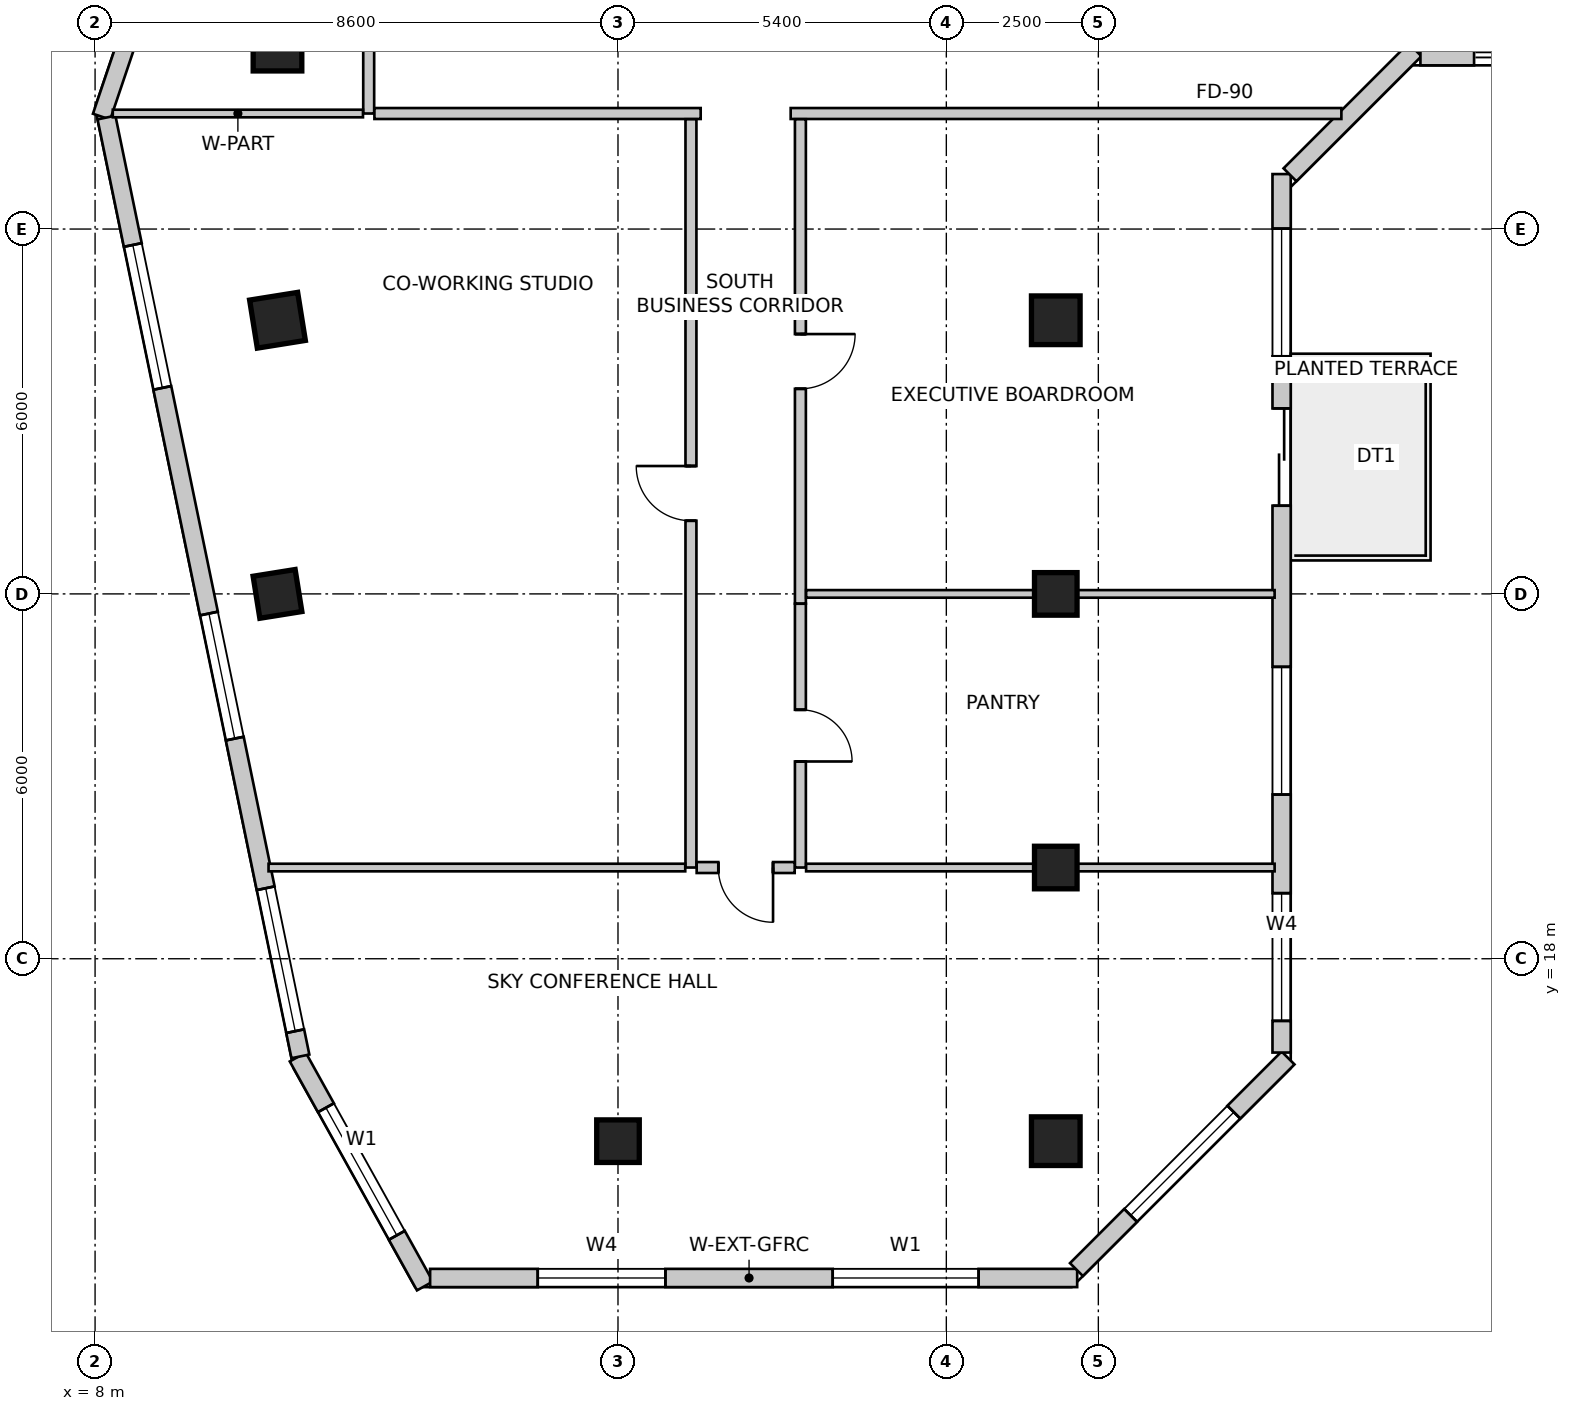
"""IFC4 building model, lengths in metres.
Left out: names, types, materials, properties, quantities, classifications, styles, units other than length and angle.
Written with IfcOpenShell. Run it as: python <this file> out.ifc"""

import sys

from ifc_helpers import new_model, si_unit, direction, frame, frame_2d, origin, origin_2d, place, context, subcontext, project, spatial, rectangle, extrude, source, transform, mapped, element, fill, save


model = new_model("IFC4")
c1 = context("Model", 3, precision=1e-05, world=origin(), true_north=direction((0.0, 1.0)))
c2 = subcontext(c1, "Body", "Model", "MODEL_VIEW")
j1 = project(units=[si_unit("LENGTHUNIT", "METRE"), si_unit("PLANEANGLEUNIT", "RADIAN")], contexts=[c1])
p1 = place(None, origin())
s1 = spatial("IfcSite", under=j1, at=p1, CompositionType="ELEMENT")
p2 = place(p1, origin())
s2 = spatial("IfcBuilding", under=s1, at=p2, CompositionType="ELEMENT")
p3 = place(p2, frame((0.0, 0.0, 239.4)))
s3 = spatial("IfcBuildingStorey", under=s2, at=p3, CompositionType="ELEMENT", Elevation=239.4)
m1 = source(origin(), c2, "Body", "SweptSolid", [
    extrude(rectangle(XDim=0.8, YDim=0.8, at=origin_2d()), origin(), (0.0, 0.0, 1.0), 3.5),
])
for number, where, z_axis, x_axis in (
    (1, (11.0, 33.0, 0.0), (0.0, 0.0, 1.0), (1.0, 0.0, 0.0)),
    (2, (11.0, 28.5, 0.0), (0.0, 0.0, 1.0), (0.158, -0.987, 0.0)),
):
    element("IfcColumn", number, at=place(p3, frame(where, z_axis=z_axis, x_axis=x_axis)), inside=s3, PredefinedType="COLUMN", context=c2, shape_type="MappedRepresentation", body=[
        mapped(m1, transform((0.0, 0.0, 0.0), scale=1.0)),
    ])
m2 = source(origin(), c2, "Body", "SweptSolid", [
    extrude(rectangle(XDim=0.7, YDim=0.7, at=origin_2d()), origin(), (0.0, 0.0, 1.0), 3.5),
])
p4 = place(p3, frame((11.0, 24.0, 0.0), z_axis=(0.0, 0.0, 1.0), x_axis=(0.158158067254, -0.987413806751, 0.0)))
e3 = element("IfcColumn", 3, at=p4, inside=s3, PredefinedType="COLUMN", context=c2, shape_type="MappedRepresentation", body=[
    mapped(m2, transform((0.0, 0.0, 0.0), scale=1.0)),
])
p5 = place(p3, frame((23.8, 28.5, 0.0), z_axis=(0.0, 0.0, 1.0), x_axis=(1.0, 0.0, 0.0)))
e4 = element("IfcColumn", 4, at=p5, inside=s3, PredefinedType="COLUMN", context=c2, shape_type="MappedRepresentation", body=[
    mapped(m1, transform((0.0, 0.0, 0.0), scale=1.0)),
])
for number, where, z_axis, x_axis in (
    (5, (23.8, 24.0, 0.0), (0.0, 0.0, 1.0), (1.0, 0.0, 0.0)),
    (6, (23.8, 19.5, 0.0), (0.0, 0.0, 1.0), (1.0, 0.0, 0.0)),
):
    element("IfcColumn", number, at=place(p3, frame(where, z_axis=z_axis, x_axis=x_axis)), inside=s3, PredefinedType="COLUMN", context=c2, shape_type="MappedRepresentation", body=[
        mapped(m2, transform((0.0, 0.0, 0.0), scale=1.0)),
    ])
p6 = place(p3, frame((23.8, 15.0, 0.0), z_axis=(0.0, 0.0, 1.0), x_axis=(1.0, 0.0, 0.0)))
e7 = element("IfcColumn", 7, at=p6, inside=s3, PredefinedType="COLUMN", context=c2, shape_type="MappedRepresentation", body=[
    mapped(m1, transform((0.0, 0.0, 0.0), scale=1.0)),
])
p7 = place(p3, frame((16.6, 15.0, 0.0), z_axis=(0.0, 0.0, 1.0), x_axis=(1.0, 0.0, 0.0)))
e8 = element("IfcColumn", 8, at=p7, inside=s3, PredefinedType="COLUMN", context=c2, shape_type="MappedRepresentation", body=[
    mapped(m2, transform((0.0, 0.0, 0.0), scale=1.0)),
])
p8 = place(p3, frame((11.333, 16.384, 0.0), z_axis=(0.0, 0.0, 1.0), x_axis=(0.485633305139, -0.874162623852, 0.0)))
e9 = element("IfcWall", 9, at=p8, inside=s3, PredefinedType="SOLIDWALL", context=c2, shape_type="SweptSolid", body=[
    extrude(rectangle(XDim=4.307, YDim=0.3, at=frame_2d((2.153, 0.0))), origin(), (0.0, 0.0, 1.0), 3.2),
])
m3 = source(origin(), c2, "Body", "SweptSolid", [
    extrude(rectangle(XDim=2.4, YDim=2.2, at=frame_2d((1.2, 1.1))), frame((0.0, 0.16, 0.0), z_axis=(0.0, -1.0, 0.0), x_axis=(1.0, 0.0, 0.0)), (0.0, 0.0, 1.0), 0.32),
])
p9 = place(p8, frame((0.954, 0.0, 0.85)))
e10 = element("IfcOpeningElement", 10, at=p9, cuts=e9, PredefinedType="OPENING", context=c2, shape_type="MappedRepresentation", body=[
    mapped(m3, transform((0.0, 0.0, 0.0), scale=1.0)),
])
p10 = place(p3, frame((13.51, 12.75, 0.0), z_axis=(0.0, 0.0, 1.0), x_axis=(1.0, 0.0, 0.0)))
e11 = element("IfcWall", 11, at=p10, inside=s3, PredefinedType="SOLIDWALL", context=c2, shape_type="SweptSolid", body=[
    extrude(rectangle(XDim=10.642, YDim=0.3, at=frame_2d((5.321, 0.0))), origin(), (0.0, 0.0, 1.0), 3.2),
])
m4 = source(origin(), c2, "Body", "SweptSolid", [
    extrude(rectangle(XDim=2.1, YDim=2.0, at=frame_2d((1.05, 1.0))), frame((0.0, 0.16, 0.0), z_axis=(0.0, -1.0, 0.0), x_axis=(1.0, 0.0, 0.0)), (0.0, 0.0, 1.0), 0.32),
])
p11 = place(p10, frame((1.77, 0.0, 0.85)))
e12 = element("IfcOpeningElement", 12, at=p11, cuts=e11, PredefinedType="OPENING", context=c2, shape_type="MappedRepresentation", body=[
    mapped(m4, transform((0.0, 0.0, 0.0), scale=1.0)),
])
p12 = place(p10, frame((6.621, 0.0, 0.85)))
e13 = element("IfcOpeningElement", 13, at=p12, cuts=e11, PredefinedType="OPENING", context=c2, shape_type="MappedRepresentation", body=[
    mapped(m3, transform((0.0, 0.0, 0.0), scale=1.0)),
])
p13 = place(p3, frame((24.14, 12.888, 0.0), z_axis=(0.0, 0.0, 1.0), x_axis=(0.707106781187, 0.707106781187, 0.0)))
e14 = element("IfcWall", 14, at=p13, inside=s3, PredefinedType="SOLIDWALL", context=c2, shape_type="SweptSolid", body=[
    extrude(rectangle(XDim=4.922, YDim=0.3, at=frame_2d((2.461, 0.0))), origin(), (0.0, 0.0, 1.0), 3.2),
])
p14 = place(p13, frame((1.261, 0.0, 0.85)))
e15 = element("IfcOpeningElement", 15, at=p14, cuts=e14, PredefinedType="OPENING", context=c2, shape_type="MappedRepresentation", body=[
    mapped(m3, transform((0.0, 0.0, 0.0), scale=1.0)),
])
p15 = place(p3, frame((27.514, 16.457, 0.0), z_axis=(0.0, 0.0, 1.0), x_axis=(0.0, 1.0, 0.0)))
e16 = element("IfcWall", 16, at=p15, inside=s3, PredefinedType="SOLIDWALL", context=c2, shape_type="SweptSolid", body=[
    extrude(rectangle(XDim=14.447, YDim=0.3, at=frame_2d((7.223, 0.0))), origin(), (0.0, 0.0, 1.0), 3.2),
])
m5 = source(origin(), c2, "Body", "SweptSolid", [
    extrude(rectangle(XDim=1.6, YDim=2.15, at=frame_2d((0.8, 1.075))), frame((0.0, 0.16, 0.0), z_axis=(0.0, -1.0, 0.0), x_axis=(1.0, 0.0, 0.0)), (0.0, 0.0, 1.0), 0.32),
])
p16 = place(p15, frame((8.993, 0.0, 0.0)))
e17 = element("IfcOpeningElement", 17, at=p16, cuts=e16, PredefinedType="OPENING", context=c2, shape_type="MappedRepresentation", body=[
    mapped(m5, transform((0.0, 0.0, 0.0), scale=1.0)),
])
p17 = place(p15, frame((0.521, 0.0, 0.85)))
e18 = element("IfcOpeningElement", 18, at=p17, cuts=e16, PredefinedType="OPENING", context=c2, shape_type="MappedRepresentation", body=[
    mapped(m4, transform((0.0, 0.0, 0.0), scale=1.0)),
])
p18 = place(p15, frame((4.243, 0.0, 0.85)))
e19 = element("IfcOpeningElement", 19, at=p18, cuts=e16, PredefinedType="OPENING", context=c2, shape_type="MappedRepresentation", body=[
    mapped(m4, transform((0.0, 0.0, 0.0), scale=1.0)),
])
p19 = place(p15, frame((11.45, 0.0, 0.85)))
e20 = element("IfcOpeningElement", 20, at=p19, cuts=e16, PredefinedType="OPENING", context=c2, shape_type="MappedRepresentation", body=[
    mapped(m4, transform((0.0, 0.0, 0.0), scale=1.0)),
])
p20 = place(p3, frame((27.652, 30.892, 0.0), z_axis=(0.0, 0.0, 1.0), x_axis=(0.707106781187, 0.707106781187, 0.0)))
e21 = element("IfcWall", 21, at=p20, inside=s3, PredefinedType="SOLIDWALL", context=c2, shape_type="SweptSolid", body=[
    extrude(rectangle(XDim=2.907, YDim=0.3, at=frame_2d((1.454, 0.0))), origin(), (0.0, 0.0, 1.0), 3.2),
])
p21 = place(p3, frame((29.797, 32.842, 0.0), z_axis=(0.0, 0.0, 1.0), x_axis=(1.0, 0.0, 0.0)))
e22 = element("IfcWall", 22, at=p21, inside=s3, PredefinedType="SOLIDWALL", context=c2, shape_type="SweptSolid", body=[
    extrude(rectangle(XDim=0.882, YDim=0.3, at=frame_2d((0.441, 0.0))), origin(), (0.0, 0.0, 1.0), 3.2),
])
p22 = place(p3, frame((13.269, 47.134, 0.0), z_axis=(0.0, 0.0, 1.0), x_axis=(-0.319920776449, -0.947444297464, 0.0)))
e23 = element("IfcWall", 23, at=p22, inside=s3, PredefinedType="SOLIDWALL", context=c2, shape_type="SweptSolid", body=[
    extrude(rectangle(XDim=16.133, YDim=0.3, at=frame_2d((8.067, 0.0))), origin(), (0.0, 0.0, 1.0), 3.2),
])
p23 = place(p22, frame((2.513, 0.0, 0.85)))
e24 = element("IfcOpeningElement", 24, at=p23, cuts=e23, PredefinedType="OPENING", context=c2, shape_type="MappedRepresentation", body=[
    mapped(m4, transform((0.0, 0.0, 0.0), scale=1.0)),
])
p24 = place(p22, frame((7.26, 0.0, 0.85)))
e25 = element("IfcOpeningElement", 25, at=p24, cuts=e23, PredefinedType="OPENING", context=c2, shape_type="MappedRepresentation", body=[
    mapped(m3, transform((0.0, 0.0, 0.0), scale=1.0)),
])
p25 = place(p22, frame((12.307, 0.0, 0.85)))
e26 = element("IfcOpeningElement", 26, at=p25, cuts=e23, PredefinedType="OPENING", context=c2, shape_type="MappedRepresentation", body=[
    mapped(m4, transform((0.0, 0.0, 0.0), scale=1.0)),
])
p26 = place(p3, frame((8.188, 31.834, 0.0), z_axis=(0.0, 0.0, 1.0), x_axis=(0.202303475707, -0.979322880217, 0.0)))
e27 = element("IfcWall", 27, at=p26, inside=s3, PredefinedType="SOLIDWALL", context=c2, shape_type="SweptSolid", body=[
    extrude(rectangle(XDim=15.766, YDim=0.3, at=frame_2d((7.883, 0.0))), origin(), (0.0, 0.0, 1.0), 3.2),
])
p27 = place(p26, frame((2.14, 0.0, 0.85)))
e28 = element("IfcOpeningElement", 28, at=p27, cuts=e27, PredefinedType="OPENING", context=c2, shape_type="MappedRepresentation", body=[
    mapped(m3, transform((0.0, 0.0, 0.0), scale=1.0)),
])
p28 = place(p26, frame((8.329, 0.0, 0.85)))
e29 = element("IfcOpeningElement", 29, at=p28, cuts=e27, PredefinedType="OPENING", context=c2, shape_type="MappedRepresentation", body=[
    mapped(m4, transform((0.0, 0.0, 0.0), scale=1.0)),
])
p29 = place(p26, frame((12.942, 0.0, 0.85)))
e30 = element("IfcOpeningElement", 30, at=p29, cuts=e27, PredefinedType="OPENING", context=c2, shape_type="MappedRepresentation", body=[
    mapped(m3, transform((0.0, 0.0, 0.0), scale=1.0)),
])
p30 = place(p3, frame((12.5, 31.9, 0.0), z_axis=(0.0, 0.0, 1.0), x_axis=(0.0, 1.0, 0.0)))
e31 = element("IfcWall", 31, at=p30, inside=s3, PredefinedType="PARTITIONING", context=c2, shape_type="SweptSolid", body=[
    extrude(rectangle(XDim=1.556, YDim=0.18, at=frame_2d((0.778, 0.0))), origin(), (0.0, 0.0, 1.0), 2.869),
])
p31 = place(p3, frame((17.96, 31.9, 0.0), z_axis=(0.0, 0.0, 1.0), x_axis=(-1.0, 0.0, 0.0)))
e32 = element("IfcWall", 32, at=p31, inside=s3, PredefinedType="PARTITIONING", context=c2, shape_type="SweptSolid", body=[
    extrude(rectangle(XDim=5.366, YDim=0.18, at=frame_2d((2.683, 0.0))), origin(), (0.0, 0.0, 1.0), 2.869),
])
p32 = place(p3, frame((28.497, 31.9, 0.0), z_axis=(0.0, 0.0, 1.0), x_axis=(-1.0, 0.0, 0.0)))
e33 = element("IfcWall", 33, at=p32, inside=s3, PredefinedType="PARTITIONING", context=c2, shape_type="SweptSolid", body=[
    extrude(rectangle(XDim=9.057, YDim=0.18, at=frame_2d((4.529, 0.0))), origin(), (0.0, 0.0, 1.0), 2.869),
])
p33 = place(p3, frame((12.406, 31.9, 0.0), z_axis=(0.0, 0.0, 1.0), x_axis=(-1.0, 0.0, 0.0)))
e34 = element("IfcWall", 34, at=p33, inside=s3, PredefinedType="PARTITIONING", context=c2, shape_type="SweptSolid", body=[
    extrude(rectangle(XDim=4.115, YDim=0.125, at=frame_2d((2.057, 0.0))), origin(), (0.0, 0.0, 1.0), 2.492),
])
p34 = place(p3, frame((17.8, 19.5, 0.0), z_axis=(0.0, 0.0, 1.0), x_axis=(0.0, 1.0, 0.0)))
e35 = element("IfcWall", 35, at=p34, inside=s3, PredefinedType="PARTITIONING", context=c2, shape_type="SweptSolid", body=[
    extrude(rectangle(XDim=12.306, YDim=0.18, at=frame_2d((6.153, 0.0))), origin(), (0.0, 0.0, 1.0), 2.716),
])
m6 = source(origin(), c2, "Body", "SweptSolid", [
    extrude(rectangle(XDim=0.9, YDim=2.15, at=frame_2d((0.45, 1.075))), frame((0.0, 0.1, 0.0), z_axis=(0.0, -1.0, 0.0), x_axis=(1.0, 0.0, 0.0)), (0.0, 0.0, 1.0), 0.2),
])
p35 = place(p34, frame((5.703, 0.0, 0.0)))
e36 = element("IfcOpeningElement", 36, at=p35, cuts=e35, PredefinedType="OPENING", context=c2, shape_type="MappedRepresentation", body=[
    mapped(m6, transform((0.0, 0.0, 0.0), scale=1.0)),
])
p36 = place(p3, frame((19.6, 31.806, 0.0), z_axis=(0.0, 0.0, 1.0), x_axis=(0.0, -1.0, 0.0)))
e37 = element("IfcWall", 37, at=p36, inside=s3, PredefinedType="PARTITIONING", context=c2, shape_type="SweptSolid", body=[
    extrude(rectangle(XDim=7.966, YDim=0.18, at=frame_2d((3.983, 0.0))), origin(), (0.0, 0.0, 1.0), 2.716),
])
p37 = place(p36, frame((3.533, 0.0, 0.0)))
e38 = element("IfcOpeningElement", 38, at=p37, cuts=e37, PredefinedType="OPENING", context=c2, shape_type="MappedRepresentation", body=[
    mapped(m6, transform((0.0, 0.0, 0.0), scale=1.0)),
])
p38 = place(p3, frame((19.6, 23.838, 0.0), z_axis=(0.0, 0.0, 1.0), x_axis=(0.0, -1.0, 0.0)))
e39 = element("IfcWall", 39, at=p38, inside=s3, PredefinedType="PARTITIONING", context=c2, shape_type="SweptSolid", body=[
    extrude(rectangle(XDim=4.338, YDim=0.18, at=frame_2d((2.169, 0.0))), origin(), (0.0, 0.0, 1.0), 2.729),
])
m7 = source(origin(), c2, "Body", "SweptSolid", [
    extrude(rectangle(XDim=0.85, YDim=2.15, at=frame_2d((0.425, 1.075))), frame((0.0, 0.1, 0.0), z_axis=(0.0, -1.0, 0.0), x_axis=(1.0, 0.0, 0.0)), (0.0, 0.0, 1.0), 0.2),
])
p39 = place(p38, frame((1.744, 0.0, 0.0)))
e40 = element("IfcOpeningElement", 40, at=p39, cuts=e39, PredefinedType="OPENING", context=c2, shape_type="MappedRepresentation", body=[
    mapped(m7, transform((0.0, 0.0, 0.0), scale=1.0)),
])
p40 = place(p3, frame((19.506, 19.5, 0.0), z_axis=(0.0, 0.0, 1.0), x_axis=(-1.0, 0.0, 0.0)))
e41 = element("IfcWall", 41, at=p40, inside=s3, PredefinedType="PARTITIONING", context=c2, shape_type="SweptSolid", body=[
    extrude(rectangle(XDim=1.612, YDim=0.18, at=frame_2d((0.806, 0.0))), origin(), (0.0, 0.0, 1.0), 3.2),
])
p41 = place(p40, frame((0.356, 0.0, 0.0)))
e42 = element("IfcOpeningElement", 42, at=p41, cuts=e41, PredefinedType="OPENING", context=c2, shape_type="MappedRepresentation", body=[
    mapped(m6, transform((0.0, 0.0, 0.0), scale=1.0)),
])
p42 = place(p3, frame((17.706, 19.5, 0.0), z_axis=(0.0, 0.0, 1.0), x_axis=(-1.0, 0.0, 0.0)))
e43 = element("IfcWall", 43, at=p42, inside=s3, PredefinedType="PARTITIONING", context=c2, shape_type="SweptSolid", body=[
    extrude(rectangle(XDim=6.853, YDim=0.125, at=frame_2d((3.427, 0.0))), origin(), (0.0, 0.0, 1.0), 3.2),
])
for number, where, z_axis, x_axis in (
    (44, (27.399, 24.0, 0.0), (0.0, 0.0, 1.0), (-1.0, 0.0, 0.0)),
    (45, (27.399, 19.5, 0.0), (0.0, 0.0, 1.0), (-1.0, 0.0, 0.0)),
):
    element("IfcWall", number, at=place(p3, frame(where, z_axis=z_axis, x_axis=x_axis)), inside=s3, PredefinedType="PARTITIONING", context=c2, shape_type="SweptSolid", body=[
        extrude(rectangle(XDim=7.705, YDim=0.125, at=frame_2d((3.853, 0.0))), origin(), (0.0, 0.0, 1.0), 2.492),
    ])
m8 = source(origin(), c2, "Body", "SweptSolid", [
    extrude(rectangle(XDim=2.4, YDim=2.2, at=frame_2d((1.2, 1.1))), frame((0.0, -0.015, 0.0), z_axis=(0.0, -1.0, 0.0), x_axis=(1.0, 0.0, 0.0)), (0.0, 0.0, 1.0), 0.06),
])
p43 = place(p9, origin())
e46 = element("IfcWindow", 46, at=p43, inside=s3, PartitioningType="SINGLE_PANEL", PredefinedType="WINDOW", context=c2, shape_type="MappedRepresentation", body=[
    mapped(m8, transform((0.0, 0.0, 0.0), scale=1.0)),
])
fill(e10, e46)
m9 = source(origin(), c2, "Body", "SweptSolid", [
    extrude(rectangle(XDim=2.1, YDim=2.0, at=frame_2d((1.05, 1.0))), frame((0.0, -0.015, 0.0), z_axis=(0.0, -1.0, 0.0), x_axis=(1.0, 0.0, 0.0)), (0.0, 0.0, 1.0), 0.06),
])
p44 = place(p11, origin())
e47 = element("IfcWindow", 47, at=p44, inside=s3, PartitioningType="SINGLE_PANEL", PredefinedType="WINDOW", context=c2, shape_type="MappedRepresentation", body=[
    mapped(m9, transform((0.0, 0.0, 0.0), scale=1.0)),
])
fill(e12, e47)
p45 = place(p12, origin())
e48 = element("IfcWindow", 48, at=p45, inside=s3, PartitioningType="SINGLE_PANEL", PredefinedType="WINDOW", context=c2, shape_type="MappedRepresentation", body=[
    mapped(m8, transform((0.0, 0.0, 0.0), scale=1.0)),
])
fill(e13, e48)
p46 = place(p14, origin())
e49 = element("IfcWindow", 49, at=p46, inside=s3, PartitioningType="SINGLE_PANEL", PredefinedType="WINDOW", context=c2, shape_type="MappedRepresentation", body=[
    mapped(m8, transform((0.0, 0.0, 0.0), scale=1.0)),
])
fill(e15, e49)
m10 = source(origin(), c2, "Body", "SweptSolid", [
    extrude(rectangle(XDim=1.6, YDim=2.15, at=frame_2d((0.8, 1.075))), frame((0.0, 0.025, 0.0), z_axis=(0.0, -1.0, 0.0), x_axis=(1.0, 0.0, 0.0)), (0.0, 0.0, 1.0), 0.05),
])
p47 = place(p16, origin())
e50 = element("IfcDoor", 50, at=p47, inside=s3, OperationType="DOUBLE_DOOR_SLIDING", PredefinedType="DOOR", context=c2, shape_type="MappedRepresentation", body=[
    mapped(m10, transform((0.0, 0.0, 0.0), scale=1.0)),
])
fill(e17, e50)
p48 = place(p17, origin())
e51 = element("IfcWindow", 51, at=p48, inside=s3, PartitioningType="SINGLE_PANEL", PredefinedType="WINDOW", context=c2, shape_type="MappedRepresentation", body=[
    mapped(m9, transform((0.0, 0.0, 0.0), scale=1.0)),
])
fill(e18, e51)
p49 = place(p18, origin())
e52 = element("IfcWindow", 52, at=p49, inside=s3, PartitioningType="SINGLE_PANEL", PredefinedType="WINDOW", context=c2, shape_type="MappedRepresentation", body=[
    mapped(m9, transform((0.0, 0.0, 0.0), scale=1.0)),
])
fill(e19, e52)
p50 = place(p19, origin())
e53 = element("IfcWindow", 53, at=p50, inside=s3, PartitioningType="SINGLE_PANEL", PredefinedType="WINDOW", context=c2, shape_type="MappedRepresentation", body=[
    mapped(m9, transform((0.0, 0.0, 0.0), scale=1.0)),
])
fill(e20, e53)
p51 = place(p27, origin())
e54 = element("IfcWindow", 54, at=p51, inside=s3, PartitioningType="SINGLE_PANEL", PredefinedType="WINDOW", context=c2, shape_type="MappedRepresentation", body=[
    mapped(m8, transform((0.0, 0.0, 0.0), scale=1.0)),
])
fill(e28, e54)
p52 = place(p28, origin())
e55 = element("IfcWindow", 55, at=p52, inside=s3, PartitioningType="SINGLE_PANEL", PredefinedType="WINDOW", context=c2, shape_type="MappedRepresentation", body=[
    mapped(m9, transform((0.0, 0.0, 0.0), scale=1.0)),
])
fill(e29, e55)
p53 = place(p29, origin())
e56 = element("IfcWindow", 56, at=p53, inside=s3, PartitioningType="SINGLE_PANEL", PredefinedType="WINDOW", context=c2, shape_type="MappedRepresentation", body=[
    mapped(m8, transform((0.0, 0.0, 0.0), scale=1.0)),
])
fill(e30, e56)
m11 = source(origin(), c2, "Body", "SweptSolid", [
    extrude(rectangle(XDim=0.9, YDim=2.15, at=frame_2d((0.45, 1.075))), frame((0.0, 0.025, 0.0), z_axis=(0.0, -1.0, 0.0), x_axis=(1.0, 0.0, 0.0)), (0.0, 0.0, 1.0), 0.05),
])
p54 = place(p35, origin())
e57 = element("IfcDoor", 57, at=p54, inside=s3, OperationType="SINGLE_SWING_RIGHT", PredefinedType="DOOR", context=c2, shape_type="MappedRepresentation", body=[
    mapped(m11, transform((0.0, 0.0, 0.0), scale=1.0)),
])
fill(e36, e57)
p55 = place(p37, origin())
e58 = element("IfcDoor", 58, at=p55, inside=s3, OperationType="SINGLE_SWING_LEFT", PredefinedType="DOOR", context=c2, shape_type="MappedRepresentation", body=[
    mapped(m11, transform((0.0, 0.0, 0.0), scale=1.0)),
])
fill(e38, e58)
m12 = source(origin(), c2, "Body", "SweptSolid", [
    extrude(rectangle(XDim=0.85, YDim=2.15, at=frame_2d((0.425, 1.075))), frame((0.0, 0.025, 0.0), z_axis=(0.0, -1.0, 0.0), x_axis=(1.0, 0.0, 0.0)), (0.0, 0.0, 1.0), 0.05),
])
p56 = place(p39, origin())
e59 = element("IfcDoor", 59, at=p56, inside=s3, OperationType="SINGLE_SWING_RIGHT", PredefinedType="DOOR", context=c2, shape_type="MappedRepresentation", body=[
    mapped(m12, transform((0.0, 0.0, 0.0), scale=1.0)),
])
fill(e40, e59)
p57 = place(p41, origin())
e60 = element("IfcDoor", 60, at=p57, inside=s3, OperationType="SINGLE_SWING_LEFT", PredefinedType="DOOR", context=c2, shape_type="MappedRepresentation", body=[
    mapped(m11, transform((0.0, 0.0, 0.0), scale=1.0)),
])
fill(e42, e60)
save(model, sys.argv[1])
